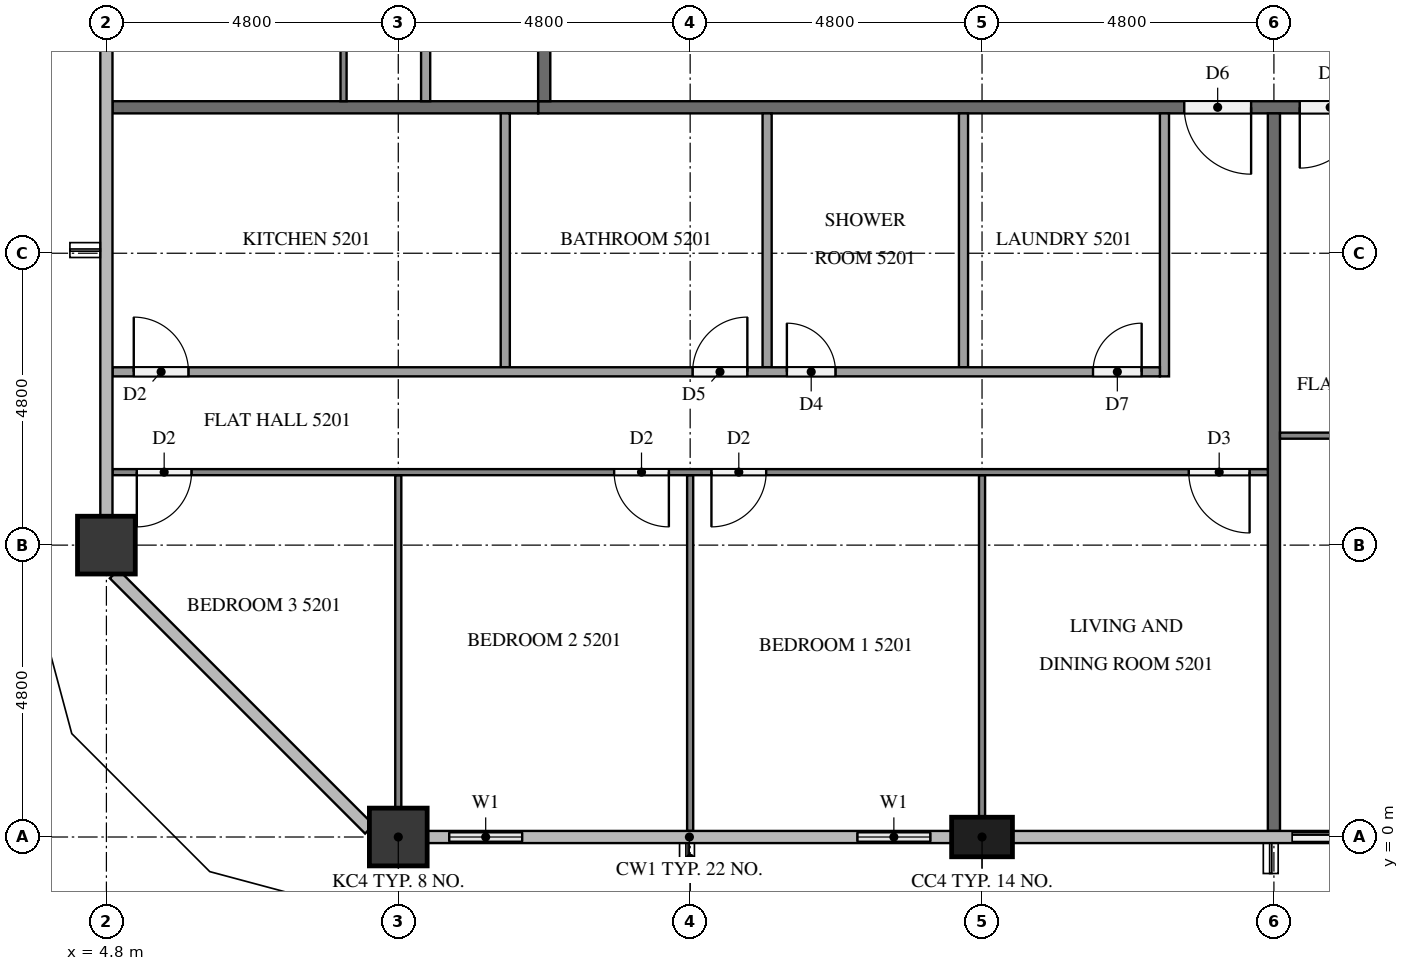
"""IFC4 building model, lengths in metres.
Left out: names, types, materials, properties, quantities, classifications, styles, units other than length and angle.
Written with IfcOpenShell. Run it as: python <this file> out.ifc"""

import sys

from ifc_helpers import new_model, si_unit, direction, frame, frame_2d, origin, origin_2d, place, context, subcontext, project, spatial, rectangle, extrude, element, fill, save


model = new_model("IFC4")
c1 = context("Model", 3, precision=1e-05, world=origin(), true_north=direction((0.0, 1.0)))
c2 = subcontext(c1, "Body", "Model", "MODEL_VIEW")
j1 = project(units=[si_unit("LENGTHUNIT", "METRE"), si_unit("PLANEANGLEUNIT", "RADIAN")], contexts=[c1])
p1 = place(None, origin())
s1 = spatial("IfcSite", under=j1, at=p1, CompositionType="ELEMENT")
p2 = place(p1, origin())
s2 = spatial("IfcBuilding", under=s1, at=p2, CompositionType="ELEMENT")
p3 = place(p2, frame((0.0, 0.0, 199.9)))
s3 = spatial("IfcBuildingStorey", under=s2, at=p3, CompositionType="ELEMENT", Elevation=199.9)
p4 = place(p3, frame((9.6, 0.0, 0.0), z_axis=(0.0, 0.0, 1.0), x_axis=(1.0, 0.0, 0.0)))
e1 = element("IfcColumn", 1, at=p4, inside=s3, PredefinedType="COLUMN", context=c2, shape_type="SweptSolid", body=[
    extrude(rectangle(XDim=0.95, YDim=0.95, at=origin_2d()), origin(), (0.0, 0.0, 1.0), 3.1),
])
p5 = place(p3, frame((19.2, 0.0, 0.0), z_axis=(0.0, 0.0, 1.0), x_axis=(1.0, 0.0, 0.0)))
e2 = element("IfcColumn", 2, at=p5, inside=s3, PredefinedType="COLUMN", context=c2, shape_type="SweptSolid", body=[
    extrude(rectangle(XDim=1.0, YDim=0.65, at=origin_2d()), origin(), (0.0, 0.0, 1.0), 3.1),
])
p6 = place(p3, frame((4.8, 4.8, 0.0), z_axis=(0.0, 0.0, 1.0), x_axis=(1.0, 0.0, 0.0)))
e3 = element("IfcColumn", 3, at=p6, inside=s3, PredefinedType="COLUMN", context=c2, shape_type="SweptSolid", body=[
    extrude(rectangle(XDim=0.95, YDim=0.95, at=origin_2d()), origin(), (0.0, 0.0, 1.0), 3.1),
])
p7 = place(p3, frame((10.075, 0.0, 0.0), z_axis=(0.0, 0.0, 1.0), x_axis=(1.0, 0.0, 0.0)))
e4 = element("IfcWall", 4, at=p7, inside=s3, PredefinedType="SOLIDWALL", context=c2, shape_type="SweptSolid", body=[
    extrude(rectangle(XDim=1.925, YDim=0.15, at=frame_2d((0.962, 0.0))), origin(), (0.0, 0.0, 1.0), 3.1),
])
p8 = place(p7, frame((0.363, 0.0, 0.9)))
e5 = element("IfcOpeningElement", 5, at=p8, cuts=e4, PredefinedType="OPENING", context=c2, shape_type="SweptSolid", body=[
    extrude(rectangle(XDim=1.2, YDim=1.4, at=frame_2d((0.6, 0.7))), frame((0.0, 0.085, 0.0), z_axis=(0.0, -1.0, 0.0), x_axis=(1.0, 0.0, 0.0)), (0.0, 0.0, 1.0), 0.17),
])
p9 = place(p3, frame((16.8, 0.0, 0.0), z_axis=(0.0, 0.0, 1.0), x_axis=(1.0, 0.0, 0.0)))
e6 = element("IfcWall", 6, at=p9, inside=s3, PredefinedType="SOLIDWALL", context=c2, shape_type="SweptSolid", body=[
    extrude(rectangle(XDim=1.9, YDim=0.15, at=frame_2d((0.95, 0.0))), origin(), (0.0, 0.0, 1.0), 3.1),
])
p10 = place(p9, frame((0.35, 0.0, 0.9)))
e7 = element("IfcOpeningElement", 7, at=p10, cuts=e6, PredefinedType="OPENING", context=c2, shape_type="SweptSolid", body=[
    extrude(rectangle(XDim=1.2, YDim=1.4, at=frame_2d((0.6, 0.7))), frame((0.0, 0.085, 0.0), z_axis=(0.0, -1.0, 0.0), x_axis=(1.0, 0.0, 0.0)), (0.0, 0.0, 1.0), 0.17),
])
p11 = place(p3, frame((24.0, 0.0, 0.0), z_axis=(0.0, 0.0, 1.0), x_axis=(1.0, 0.0, 0.0)))
e8 = element("IfcWall", 8, at=p11, inside=s3, PredefinedType="SOLIDWALL", context=c2, shape_type="SweptSolid", body=[
    extrude(rectangle(XDim=2.4, YDim=0.15, at=frame_2d((1.2, 0.0))), origin(), (0.0, 0.0, 1.0), 3.1),
])
p12 = place(p11, frame((0.3, 0.0, 0.0)))
e9 = element("IfcOpeningElement", 9, at=p12, cuts=e8, PredefinedType="OPENING", context=c2, shape_type="SweptSolid", body=[
    extrude(rectangle(XDim=1.8, YDim=2.4, at=frame_2d((0.9, 1.2))), frame((0.0, 0.085, 0.0), z_axis=(0.0, -1.0, 0.0), x_axis=(1.0, 0.0, 0.0)), (0.0, 0.0, 1.0), 0.17),
])
p13 = place(p3, frame((50.5, 12.0, 0.0), z_axis=(0.0, 0.0, 1.0), x_axis=(-1.0, 0.0, 0.0)))
e10 = element("IfcWall", 10, at=p13, inside=s3, PredefinedType="PARTITIONING", context=c2, shape_type="SweptSolid", body=[
    extrude(rectangle(XDim=38.6, YDim=0.2, at=frame_2d((19.3, 0.0))), origin(), (0.0, 0.0, 1.0), 3.1),
])
p14 = place(p13, frame((26.875, 0.0, 0.0)))
e11 = element("IfcOpeningElement", 11, at=p14, cuts=e10, PredefinedType="OPENING", context=c2, shape_type="SweptSolid", body=[
    extrude(rectangle(XDim=1.1, YDim=2.1, at=frame_2d((0.55, 1.05))), frame((0.0, 0.11, 0.0), z_axis=(0.0, -1.0, 0.0), x_axis=(1.0, 0.0, 0.0)), (0.0, 0.0, 1.0), 0.22),
])
p15 = place(p13, frame((25.075, 0.0, 0.0)))
e12 = element("IfcOpeningElement", 12, at=p15, cuts=e10, PredefinedType="OPENING", context=c2, shape_type="SweptSolid", body=[
    extrude(rectangle(XDim=1.0, YDim=2.1, at=frame_2d((0.5, 1.05))), frame((0.0, 0.11, 0.0), z_axis=(0.0, -1.0, 0.0), x_axis=(1.0, 0.0, 0.0)), (0.0, 0.0, 1.0), 0.22),
])
p16 = place(p13, frame((10.125, 0.0, 0.0)))
e13 = element("IfcOpeningElement", 13, at=p16, cuts=e10, PredefinedType="OPENING", context=c2, shape_type="SweptSolid", body=[
    extrude(rectangle(XDim=1.0, YDim=2.1, at=frame_2d((0.5, 1.05))), frame((0.0, 0.11, 0.0), z_axis=(0.0, -1.0, 0.0), x_axis=(1.0, 0.0, 0.0)), (0.0, 0.0, 1.0), 0.22),
])
p17 = place(p13, frame((8.275, 0.0, 0.0)))
e14 = element("IfcOpeningElement", 14, at=p17, cuts=e10, PredefinedType="OPENING", context=c2, shape_type="SweptSolid", body=[
    extrude(rectangle(XDim=1.0, YDim=2.1, at=frame_2d((0.5, 1.05))), frame((0.0, 0.11, 0.0), z_axis=(0.0, -1.0, 0.0), x_axis=(1.0, 0.0, 0.0)), (0.0, 0.0, 1.0), 0.22),
])
p18 = place(p3, frame((12.0, 12.1, 0.0), z_axis=(0.0, 0.0, 1.0), x_axis=(0.0, 1.0, 0.0)))
e15 = element("IfcWall", 15, at=p18, inside=s3, PredefinedType="PARTITIONING", context=c2, shape_type="SweptSolid", body=[
    extrude(rectangle(XDim=28.6, YDim=0.2, at=frame_2d((14.3, 0.0))), origin(), (0.0, 0.0, 1.0), 3.1),
])
p19 = place(p18, frame((21.925, 0.0, 0.0)))
e16 = element("IfcOpeningElement", 16, at=p19, cuts=e15, PredefinedType="OPENING", context=c2, shape_type="SweptSolid", body=[
    extrude(rectangle(XDim=1.0, YDim=2.1, at=frame_2d((0.5, 1.05))), frame((0.0, 0.11, 0.0), z_axis=(0.0, -1.0, 0.0), x_axis=(1.0, 0.0, 0.0)), (0.0, 0.0, 1.0), 0.22),
])
p20 = place(p18, frame((14.725, 0.0, 0.0)))
e17 = element("IfcOpeningElement", 17, at=p20, cuts=e15, PredefinedType="OPENING", context=c2, shape_type="SweptSolid", body=[
    extrude(rectangle(XDim=1.0, YDim=2.1, at=frame_2d((0.5, 1.05))), frame((0.0, 0.11, 0.0), z_axis=(0.0, -1.0, 0.0), x_axis=(1.0, 0.0, 0.0)), (0.0, 0.0, 1.0), 0.22),
])
p21 = place(p18, frame((12.875, 0.0, 0.0)))
e18 = element("IfcOpeningElement", 18, at=p21, cuts=e15, PredefinedType="OPENING", context=c2, shape_type="SweptSolid", body=[
    extrude(rectangle(XDim=1.0, YDim=2.1, at=frame_2d((0.5, 1.05))), frame((0.0, 0.11, 0.0), z_axis=(0.0, -1.0, 0.0), x_axis=(1.0, 0.0, 0.0)), (0.0, 0.0, 1.0), 0.22),
])
p22 = place(p3, frame((24.0, 11.9, 0.0), z_axis=(0.0, 0.0, 1.0), x_axis=(0.0, -1.0, 0.0)))
e19 = element("IfcWall", 19, at=p22, inside=s3, PredefinedType="PARTITIONING", context=c2, shape_type="SweptSolid", body=[
    extrude(rectangle(XDim=11.8, YDim=0.2, at=frame_2d((5.9, 0.0))), origin(), (0.0, 0.0, 1.0), 3.1),
])
p23 = place(p3, frame((4.9, 12.0, 0.0), z_axis=(0.0, 0.0, 1.0), x_axis=(1.0, 0.0, 0.0)))
e20 = element("IfcWall", 20, at=p23, inside=s3, PredefinedType="PARTITIONING", context=c2, shape_type="SweptSolid", body=[
    extrude(rectangle(XDim=7.0, YDim=0.2, at=frame_2d((3.5, 0.0))), origin(), (0.0, 0.0, 1.0), 3.1),
])
p24 = place(p3, frame((19.2, 5.95, 0.0), z_axis=(0.0, 0.0, 1.0), x_axis=(0.0, -1.0, 0.0)))
e21 = element("IfcWall", 21, at=p24, inside=s3, PredefinedType="PARTITIONING", context=c2, shape_type="SweptSolid", body=[
    extrude(rectangle(XDim=5.625, YDim=0.1, at=frame_2d((2.812, 0.0))), origin(), (0.0, 0.0, 1.0), 3.1),
])
p25 = place(p3, frame((14.4, 5.95, 0.0), z_axis=(0.0, 0.0, 1.0), x_axis=(0.0, -1.0, 0.0)))
e22 = element("IfcWall", 22, at=p25, inside=s3, PredefinedType="PARTITIONING", context=c2, shape_type="SweptSolid", body=[
    extrude(rectangle(XDim=5.85, YDim=0.1, at=frame_2d((2.925, 0.0))), origin(), (0.0, 0.0, 1.0), 3.1),
])
p26 = place(p3, frame((9.6, 5.95, 0.0), z_axis=(0.0, 0.0, 1.0), x_axis=(0.0, -1.0, 0.0)))
e23 = element("IfcWall", 23, at=p26, inside=s3, PredefinedType="PARTITIONING", context=c2, shape_type="SweptSolid", body=[
    extrude(rectangle(XDim=5.475, YDim=0.1, at=frame_2d((2.737, 0.0))), origin(), (0.0, 0.0, 1.0), 3.1),
])
p27 = place(p3, frame((23.9, 6.0, 0.0), z_axis=(0.0, 0.0, 1.0), x_axis=(-1.0, 0.0, 0.0)))
e24 = element("IfcWall", 24, at=p27, inside=s3, PredefinedType="PARTITIONING", context=c2, shape_type="SweptSolid", body=[
    extrude(rectangle(XDim=19.0, YDim=0.1, at=frame_2d((9.5, 0.0))), origin(), (0.0, 0.0, 1.0), 3.1),
])
p28 = place(p27, frame((0.3, 0.0, 0.0)))
e25 = element("IfcOpeningElement", 25, at=p28, cuts=e24, PredefinedType="OPENING", context=c2, shape_type="SweptSolid", body=[
    extrude(rectangle(XDim=1.0, YDim=2.1, at=frame_2d((0.5, 1.05))), frame((0.0, 0.06, 0.0), z_axis=(0.0, -1.0, 0.0), x_axis=(1.0, 0.0, 0.0)), (0.0, 0.0, 1.0), 0.12),
])
p29 = place(p27, frame((8.25, 0.0, 0.0)))
e26 = element("IfcOpeningElement", 26, at=p29, cuts=e24, PredefinedType="OPENING", context=c2, shape_type="SweptSolid", body=[
    extrude(rectangle(XDim=0.9, YDim=2.1, at=frame_2d((0.45, 1.05))), frame((0.0, 0.06, 0.0), z_axis=(0.0, -1.0, 0.0), x_axis=(1.0, 0.0, 0.0)), (0.0, 0.0, 1.0), 0.12),
])
p30 = place(p27, frame((9.85, 0.0, 0.0)))
e27 = element("IfcOpeningElement", 27, at=p30, cuts=e24, PredefinedType="OPENING", context=c2, shape_type="SweptSolid", body=[
    extrude(rectangle(XDim=0.9, YDim=2.1, at=frame_2d((0.45, 1.05))), frame((0.0, 0.06, 0.0), z_axis=(0.0, -1.0, 0.0), x_axis=(1.0, 0.0, 0.0)), (0.0, 0.0, 1.0), 0.12),
])
p31 = place(p27, frame((17.7, 0.0, 0.0)))
e28 = element("IfcOpeningElement", 28, at=p31, cuts=e24, PredefinedType="OPENING", context=c2, shape_type="SweptSolid", body=[
    extrude(rectangle(XDim=0.9, YDim=2.1, at=frame_2d((0.45, 1.05))), frame((0.0, 0.06, 0.0), z_axis=(0.0, -1.0, 0.0), x_axis=(1.0, 0.0, 0.0)), (0.0, 0.0, 1.0), 0.12),
])
for number, where, z_axis, x_axis in (
    (29, (18.895, 11.9, 0.0), (0.0, 0.0, 1.0), (0.0, -1.0, 0.0)),
    (30, (15.666, 11.9, 0.0), (0.0, 0.0, 1.0), (0.0, -1.0, 0.0)),
    (31, (11.359, 11.9, 0.0), (0.0, 0.0, 1.0), (0.0, -1.0, 0.0)),
):
    element("IfcWall", number, at=place(p3, frame(where, z_axis=z_axis, x_axis=x_axis)), inside=s3, PredefinedType="PARTITIONING", context=c2, shape_type="SweptSolid", body=[
        extrude(rectangle(XDim=4.175, YDim=0.15, at=frame_2d((2.087, 0.0))), origin(), (0.0, 0.0, 1.0), 3.1),
    ])
p32 = place(p3, frame((22.2, 11.9, 0.0), z_axis=(0.0, 0.0, 1.0), x_axis=(0.0, -1.0, 0.0)))
e32 = element("IfcWall", 32, at=p32, inside=s3, PredefinedType="PARTITIONING", context=c2, shape_type="SweptSolid", body=[
    extrude(rectangle(XDim=4.325, YDim=0.15, at=frame_2d((2.163, 0.0))), origin(), (0.0, 0.0, 1.0), 3.1),
])
p33 = place(p3, frame((4.9, 7.65, 0.0), z_axis=(0.0, 0.0, 1.0), x_axis=(1.0, 0.0, 0.0)))
e33 = element("IfcWall", 33, at=p33, inside=s3, PredefinedType="PARTITIONING", context=c2, shape_type="SweptSolid", body=[
    extrude(rectangle(XDim=17.225, YDim=0.15, at=frame_2d((8.613, 0.0))), origin(), (0.0, 0.0, 1.0), 3.1),
])
p34 = place(p33, frame((16.125, 0.0, 0.0)))
e34 = element("IfcOpeningElement", 34, at=p34, cuts=e33, PredefinedType="OPENING", context=c2, shape_type="SweptSolid", body=[
    extrude(rectangle(XDim=0.8, YDim=2.1, at=frame_2d((0.4, 1.05))), frame((0.0, 0.085, 0.0), z_axis=(0.0, -1.0, 0.0), x_axis=(1.0, 0.0, 0.0)), (0.0, 0.0, 1.0), 0.17),
])
p35 = place(p33, frame((11.091, 0.0, 0.0)))
e35 = element("IfcOpeningElement", 35, at=p35, cuts=e33, PredefinedType="OPENING", context=c2, shape_type="SweptSolid", body=[
    extrude(rectangle(XDim=0.8, YDim=2.1, at=frame_2d((0.4, 1.05))), frame((0.0, 0.085, 0.0), z_axis=(0.0, -1.0, 0.0), x_axis=(1.0, 0.0, 0.0)), (0.0, 0.0, 1.0), 0.17),
])
p36 = place(p33, frame((9.541, 0.0, 0.0)))
e36 = element("IfcOpeningElement", 36, at=p36, cuts=e33, PredefinedType="OPENING", context=c2, shape_type="SweptSolid", body=[
    extrude(rectangle(XDim=0.9, YDim=2.1, at=frame_2d((0.45, 1.05))), frame((0.0, 0.085, 0.0), z_axis=(0.0, -1.0, 0.0), x_axis=(1.0, 0.0, 0.0)), (0.0, 0.0, 1.0), 0.17),
])
p37 = place(p33, frame((0.35, 0.0, 0.0)))
e37 = element("IfcOpeningElement", 37, at=p37, cuts=e33, PredefinedType="OPENING", context=c2, shape_type="SweptSolid", body=[
    extrude(rectangle(XDim=0.9, YDim=2.1, at=frame_2d((0.45, 1.05))), frame((0.0, 0.085, 0.0), z_axis=(0.0, -1.0, 0.0), x_axis=(1.0, 0.0, 0.0)), (0.0, 0.0, 1.0), 0.17),
])
p38 = place(p3, frame((31.1, 6.6, 0.0), z_axis=(0.0, 0.0, 1.0), x_axis=(-1.0, 0.0, 0.0)))
e38 = element("IfcWall", 38, at=p38, inside=s3, PredefinedType="PARTITIONING", context=c2, shape_type="SweptSolid", body=[
    extrude(rectangle(XDim=7.0, YDim=0.1, at=frame_2d((3.5, 0.0))), origin(), (0.0, 0.0, 1.0), 3.1),
])
p39 = place(p38, frame((0.3, 0.0, 0.0)))
e39 = element("IfcOpeningElement", 39, at=p39, cuts=e38, PredefinedType="OPENING", context=c2, shape_type="SweptSolid", body=[
    extrude(rectangle(XDim=1.0, YDim=2.1, at=frame_2d((0.5, 1.05))), frame((0.0, 0.06, 0.0), z_axis=(0.0, -1.0, 0.0), x_axis=(1.0, 0.0, 0.0)), (0.0, 0.0, 1.0), 0.12),
])
p40 = place(p3, frame((8.7, 12.1, 0.0), z_axis=(0.0, 0.0, 1.0), x_axis=(0.0, 1.0, 0.0)))
e40 = element("IfcWall", 40, at=p40, inside=s3, PredefinedType="PARTITIONING", context=c2, shape_type="SweptSolid", body=[
    extrude(rectangle(XDim=14.2, YDim=0.1, at=frame_2d((7.1, 0.0))), origin(), (0.0, 0.0, 1.0), 3.1),
])
p41 = place(p40, frame((13.0, 0.0, 0.0)))
e41 = element("IfcOpeningElement", 41, at=p41, cuts=e40, PredefinedType="OPENING", context=c2, shape_type="SweptSolid", body=[
    extrude(rectangle(XDim=0.9, YDim=2.1, at=frame_2d((0.45, 1.05))), frame((0.0, 0.06, 0.0), z_axis=(0.0, -1.0, 0.0), x_axis=(1.0, 0.0, 0.0)), (0.0, 0.0, 1.0), 0.12),
])
p42 = place(p40, frame((5.05, 0.0, 0.0)))
e42 = element("IfcOpeningElement", 42, at=p42, cuts=e40, PredefinedType="OPENING", context=c2, shape_type="SweptSolid", body=[
    extrude(rectangle(XDim=1.0, YDim=2.1, at=frame_2d((0.5, 1.05))), frame((0.0, 0.06, 0.0), z_axis=(0.0, -1.0, 0.0), x_axis=(1.0, 0.0, 0.0)), (0.0, 0.0, 1.0), 0.12),
])
p43 = place(p40, frame((3.45, 0.0, 0.0)))
e43 = element("IfcOpeningElement", 43, at=p43, cuts=e40, PredefinedType="OPENING", context=c2, shape_type="SweptSolid", body=[
    extrude(rectangle(XDim=0.9, YDim=2.1, at=frame_2d((0.45, 1.05))), frame((0.0, 0.06, 0.0), z_axis=(0.0, -1.0, 0.0), x_axis=(1.0, 0.0, 0.0)), (0.0, 0.0, 1.0), 0.12),
])
p44 = place(p3, frame((10.05, 24.525, 0.0), z_axis=(0.0, 0.0, 1.0), x_axis=(0.0, -1.0, 0.0)))
e44 = element("IfcWall", 44, at=p44, inside=s3, PredefinedType="PARTITIONING", context=c2, shape_type="SweptSolid", body=[
    extrude(rectangle(XDim=12.425, YDim=0.15, at=frame_2d((6.212, 0.0))), origin(), (0.0, 0.0, 1.0), 3.1),
])
p45 = place(p44, frame((0.3, 0.0, 0.0)))
e45 = element("IfcOpeningElement", 45, at=p45, cuts=e44, PredefinedType="OPENING", context=c2, shape_type="SweptSolid", body=[
    extrude(rectangle(XDim=0.9, YDim=2.1, at=frame_2d((0.45, 1.05))), frame((0.0, 0.085, 0.0), z_axis=(0.0, -1.0, 0.0), x_axis=(1.0, 0.0, 0.0)), (0.0, 0.0, 1.0), 0.17),
])
p46 = place(p44, frame((8.333, 0.0, 0.0)))
e46 = element("IfcOpeningElement", 46, at=p46, cuts=e44, PredefinedType="OPENING", context=c2, shape_type="SweptSolid", body=[
    extrude(rectangle(XDim=0.9, YDim=2.1, at=frame_2d((0.45, 1.05))), frame((0.0, 0.085, 0.0), z_axis=(0.0, -1.0, 0.0), x_axis=(1.0, 0.0, 0.0)), (0.0, 0.0, 1.0), 0.17),
])
p47 = place(p44, frame((9.883, 0.0, 0.0)))
e47 = element("IfcOpeningElement", 47, at=p47, cuts=e44, PredefinedType="OPENING", context=c2, shape_type="SweptSolid", body=[
    extrude(rectangle(XDim=0.8, YDim=2.1, at=frame_2d((0.4, 1.05))), frame((0.0, 0.085, 0.0), z_axis=(0.0, -1.0, 0.0), x_axis=(1.0, 0.0, 0.0)), (0.0, 0.0, 1.0), 0.17),
])
p48 = place(p8, origin())
e48 = element("IfcWindow", 48, at=p48, inside=s3, PartitioningType="SINGLE_PANEL", PredefinedType="WINDOW", context=c2, shape_type="SweptSolid", body=[
    extrude(rectangle(XDim=1.2, YDim=1.4, at=frame_2d((0.6, 0.7))), frame((0.0, 0.03, 0.0), z_axis=(0.0, -1.0, 0.0), x_axis=(1.0, 0.0, 0.0)), (0.0, 0.0, 1.0), 0.06),
])
fill(e5, e48)
p49 = place(p10, origin())
e49 = element("IfcWindow", 49, at=p49, inside=s3, PartitioningType="SINGLE_PANEL", PredefinedType="WINDOW", context=c2, shape_type="SweptSolid", body=[
    extrude(rectangle(XDim=1.2, YDim=1.4, at=frame_2d((0.6, 0.7))), frame((0.0, 0.03, 0.0), z_axis=(0.0, -1.0, 0.0), x_axis=(1.0, 0.0, 0.0)), (0.0, 0.0, 1.0), 0.06),
])
fill(e7, e49)
p50 = place(p12, origin())
e50 = element("IfcDoor", 50, at=p50, inside=s3, OperationType="SLIDING_TO_LEFT", PredefinedType="DOOR", context=c2, shape_type="SweptSolid", body=[
    extrude(rectangle(XDim=1.8, YDim=2.4, at=frame_2d((0.9, 1.2))), frame((0.0, 0.025, 0.0), z_axis=(0.0, -1.0, 0.0), x_axis=(1.0, 0.0, 0.0)), (0.0, 0.0, 1.0), 0.05),
])
fill(e9, e50)
p51 = place(p14, origin())
e51 = element("IfcDoor", 51, at=p51, inside=s3, OperationType="SINGLE_SWING_LEFT", PredefinedType="DOOR", context=c2, shape_type="SweptSolid", body=[
    extrude(rectangle(XDim=1.1, YDim=2.1, at=frame_2d((0.55, 1.05))), frame((0.0, 0.025, 0.0), z_axis=(0.0, -1.0, 0.0), x_axis=(1.0, 0.0, 0.0)), (0.0, 0.0, 1.0), 0.05),
])
fill(e11, e51)
p52 = place(p15, origin())
e52 = element("IfcDoor", 52, at=p52, inside=s3, OperationType="SINGLE_SWING_RIGHT", PredefinedType="DOOR", context=c2, shape_type="SweptSolid", body=[
    extrude(rectangle(XDim=1.0, YDim=2.1, at=frame_2d((0.5, 1.05))), frame((0.0, 0.025, 0.0), z_axis=(0.0, -1.0, 0.0), x_axis=(1.0, 0.0, 0.0)), (0.0, 0.0, 1.0), 0.05),
])
fill(e12, e52)
p53 = place(p28, origin())
e53 = element("IfcDoor", 53, at=p53, inside=s3, OperationType="SINGLE_SWING_LEFT", PredefinedType="DOOR", context=c2, shape_type="SweptSolid", body=[
    extrude(rectangle(XDim=1.0, YDim=2.1, at=frame_2d((0.5, 1.05))), frame((0.0, 0.025, 0.0), z_axis=(0.0, -1.0, 0.0), x_axis=(1.0, 0.0, 0.0)), (0.0, 0.0, 1.0), 0.05),
])
fill(e25, e53)
p54 = place(p29, origin())
e54 = element("IfcDoor", 54, at=p54, inside=s3, OperationType="SINGLE_SWING_RIGHT", PredefinedType="DOOR", context=c2, shape_type="SweptSolid", body=[
    extrude(rectangle(XDim=0.9, YDim=2.1, at=frame_2d((0.45, 1.05))), frame((0.0, 0.025, 0.0), z_axis=(0.0, -1.0, 0.0), x_axis=(1.0, 0.0, 0.0)), (0.0, 0.0, 1.0), 0.05),
])
fill(e26, e54)
p55 = place(p30, origin())
e55 = element("IfcDoor", 55, at=p55, inside=s3, OperationType="SINGLE_SWING_LEFT", PredefinedType="DOOR", context=c2, shape_type="SweptSolid", body=[
    extrude(rectangle(XDim=0.9, YDim=2.1, at=frame_2d((0.45, 1.05))), frame((0.0, 0.025, 0.0), z_axis=(0.0, -1.0, 0.0), x_axis=(1.0, 0.0, 0.0)), (0.0, 0.0, 1.0), 0.05),
])
fill(e27, e55)
p56 = place(p31, origin())
e56 = element("IfcDoor", 56, at=p56, inside=s3, OperationType="SINGLE_SWING_RIGHT", PredefinedType="DOOR", context=c2, shape_type="SweptSolid", body=[
    extrude(rectangle(XDim=0.9, YDim=2.1, at=frame_2d((0.45, 1.05))), frame((0.0, 0.025, 0.0), z_axis=(0.0, -1.0, 0.0), x_axis=(1.0, 0.0, 0.0)), (0.0, 0.0, 1.0), 0.05),
])
fill(e28, e56)
p57 = place(p34, origin())
e57 = element("IfcDoor", 57, at=p57, inside=s3, OperationType="SINGLE_SWING_RIGHT", PredefinedType="DOOR", context=c2, shape_type="SweptSolid", body=[
    extrude(rectangle(XDim=0.8, YDim=2.1, at=frame_2d((0.4, 1.05))), frame((0.0, 0.025, 0.0), z_axis=(0.0, -1.0, 0.0), x_axis=(1.0, 0.0, 0.0)), (0.0, 0.0, 1.0), 0.05),
])
fill(e34, e57)
p58 = place(p35, origin())
e58 = element("IfcDoor", 58, at=p58, inside=s3, OperationType="SINGLE_SWING_LEFT", PredefinedType="DOOR", context=c2, shape_type="SweptSolid", body=[
    extrude(rectangle(XDim=0.8, YDim=2.1, at=frame_2d((0.4, 1.05))), frame((0.0, 0.025, 0.0), z_axis=(0.0, -1.0, 0.0), x_axis=(1.0, 0.0, 0.0)), (0.0, 0.0, 1.0), 0.05),
])
fill(e35, e58)
p59 = place(p36, origin())
e59 = element("IfcDoor", 59, at=p59, inside=s3, OperationType="SINGLE_SWING_RIGHT", PredefinedType="DOOR", context=c2, shape_type="SweptSolid", body=[
    extrude(rectangle(XDim=0.9, YDim=2.1, at=frame_2d((0.45, 1.05))), frame((0.0, 0.025, 0.0), z_axis=(0.0, -1.0, 0.0), x_axis=(1.0, 0.0, 0.0)), (0.0, 0.0, 1.0), 0.05),
])
fill(e36, e59)
p60 = place(p37, origin())
e60 = element("IfcDoor", 60, at=p60, inside=s3, OperationType="SINGLE_SWING_LEFT", PredefinedType="DOOR", context=c2, shape_type="SweptSolid", body=[
    extrude(rectangle(XDim=0.9, YDim=2.1, at=frame_2d((0.45, 1.05))), frame((0.0, 0.025, 0.0), z_axis=(0.0, -1.0, 0.0), x_axis=(1.0, 0.0, 0.0)), (0.0, 0.0, 1.0), 0.05),
])
fill(e37, e60)
save(model, sys.argv[1])
